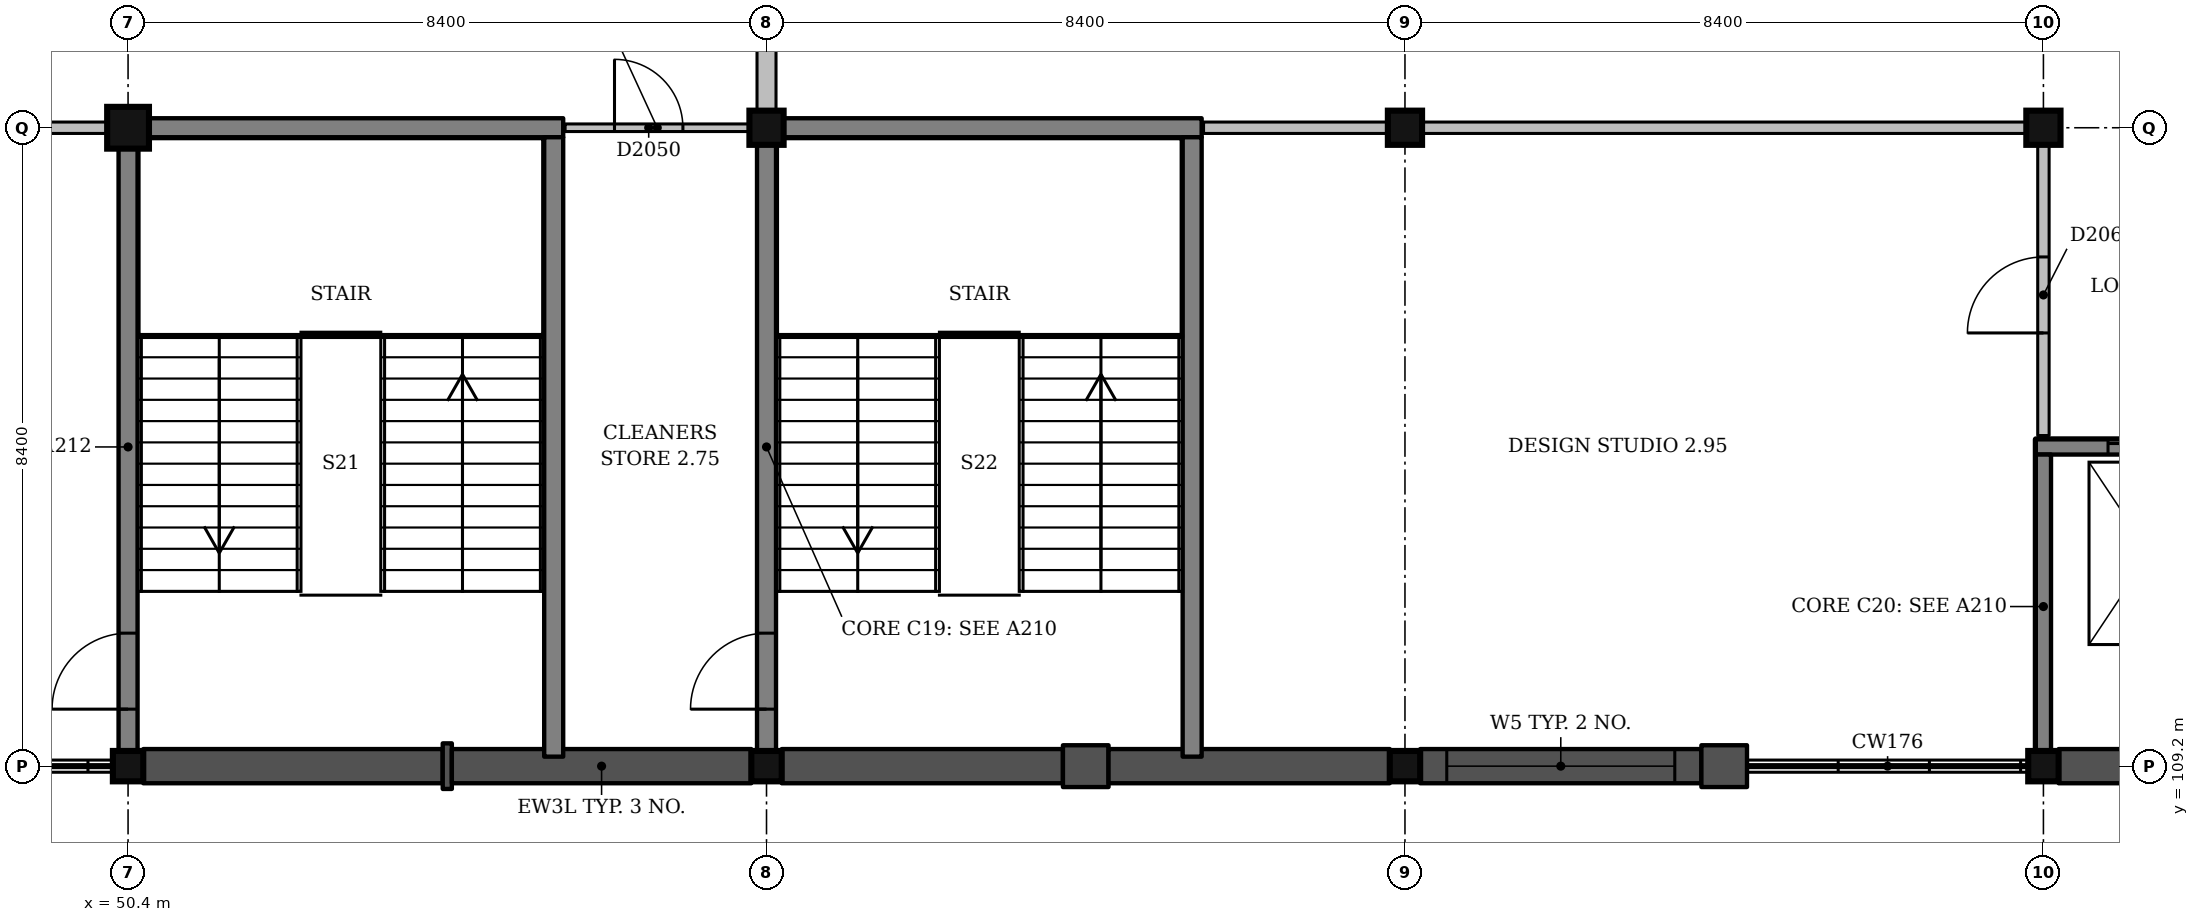
"""IFC4 building model, lengths in metres.
Left out: names, types, materials, properties, quantities, classifications, styles, units other than length and angle.
Written with IfcOpenShell. Run it as: python <this file> out.ifc"""

import sys

from ifc_helpers import new_model, si_unit, direction, frame, frame_2d, origin, origin_2d, place, context, subcontext, project, spatial, rectangle, extrude, element, fill, save


model = new_model("IFC4")
c1 = context("Model", 3, precision=1e-05, world=origin(), true_north=direction((0.0, 1.0)))
c2 = subcontext(c1, "Body", "Model", "MODEL_VIEW")
j1 = project(units=[si_unit("LENGTHUNIT", "METRE"), si_unit("PLANEANGLEUNIT", "RADIAN")], contexts=[c1])
p1 = place(None, origin())
s1 = spatial("IfcSite", under=j1, at=p1, CompositionType="ELEMENT")
p2 = place(p1, origin())
s2 = spatial("IfcBuilding", under=s1, at=p2, CompositionType="ELEMENT")
p3 = place(p2, frame((0.0, 0.0, 9.0)))
s3 = spatial("IfcBuildingStorey", under=s2, at=p3, CompositionType="ELEMENT", Elevation=9.0)
p4 = place(p3, frame((50.4, 109.2, -0.25), z_axis=(0.0, 0.0, 1.0), x_axis=(1.0, 0.0, 0.0)))
e1 = element("IfcColumn", 1, at=p4, inside=s3, PredefinedType="COLUMN", context=c2, shape_type="SweptSolid", body=[
    extrude(rectangle(XDim=0.4, YDim=0.4, at=origin_2d()), origin(), (0.0, 0.0, 1.0), 4.75),
])
p5 = place(p3, frame((50.4, 117.6, -1.5), z_axis=(0.0, 0.0, 1.0), x_axis=(1.0, 0.0, 0.0)))
e2 = element("IfcColumn", 2, at=p5, inside=s3, PredefinedType="COLUMN", context=c2, shape_type="SweptSolid", body=[
    extrude(rectangle(XDim=0.55, YDim=0.55, at=origin_2d()), origin(), (0.0, 0.0, 1.0), 6.0),
])
p6 = place(p3, frame((58.8, 109.2, -0.25), z_axis=(0.0, 0.0, 1.0), x_axis=(1.0, 0.0, 0.0)))
e3 = element("IfcColumn", 3, at=p6, inside=s3, PredefinedType="COLUMN", context=c2, shape_type="SweptSolid", body=[
    extrude(rectangle(XDim=0.4, YDim=0.4, at=origin_2d()), origin(), (0.0, 0.0, 1.0), 4.75),
])
p7 = place(p3, frame((58.8, 117.6, -1.5), z_axis=(0.0, 0.0, 1.0), x_axis=(1.0, 0.0, 0.0)))
e4 = element("IfcColumn", 4, at=p7, inside=s3, PredefinedType="COLUMN", context=c2, shape_type="SweptSolid", body=[
    extrude(rectangle(XDim=0.45, YDim=0.45, at=origin_2d()), origin(), (0.0, 0.0, 1.0), 6.0),
])
p8 = place(p3, frame((67.2, 109.2, -0.25), z_axis=(0.0, 0.0, 1.0), x_axis=(1.0, 0.0, 0.0)))
e5 = element("IfcColumn", 5, at=p8, inside=s3, PredefinedType="COLUMN", context=c2, shape_type="SweptSolid", body=[
    extrude(rectangle(XDim=0.4, YDim=0.4, at=origin_2d()), origin(), (0.0, 0.0, 1.0), 4.75),
])
p9 = place(p3, frame((67.2, 117.6, -1.5), z_axis=(0.0, 0.0, 1.0), x_axis=(1.0, 0.0, 0.0)))
e6 = element("IfcColumn", 6, at=p9, inside=s3, PredefinedType="COLUMN", context=c2, shape_type="SweptSolid", body=[
    extrude(rectangle(XDim=0.45, YDim=0.45, at=origin_2d()), origin(), (0.0, 0.0, 1.0), 6.0),
])
p10 = place(p3, frame((75.6, 109.2, -0.25), z_axis=(0.0, 0.0, 1.0), x_axis=(1.0, 0.0, 0.0)))
e7 = element("IfcColumn", 7, at=p10, inside=s3, PredefinedType="COLUMN", context=c2, shape_type="SweptSolid", body=[
    extrude(rectangle(XDim=0.4, YDim=0.4, at=origin_2d()), origin(), (0.0, 0.0, 1.0), 4.75),
])
p11 = place(p3, frame((75.6, 117.6, -1.5), z_axis=(0.0, 0.0, 1.0), x_axis=(1.0, 0.0, 0.0)))
e8 = element("IfcColumn", 8, at=p11, inside=s3, PredefinedType="COLUMN", context=c2, shape_type="SweptSolid", body=[
    extrude(rectangle(XDim=0.45, YDim=0.45, at=origin_2d()), origin(), (0.0, 0.0, 1.0), 6.0),
])
p12 = place(p3, frame((75.5, 113.4, 0.0), z_axis=(0.0, 0.0, 1.0), x_axis=(1.0, 0.0, 0.0)))
e9 = element("IfcWall", 9, at=p12, inside=s3, PredefinedType="SHEAR", context=c2, shape_type="SweptSolid", body=[
    extrude(rectangle(XDim=3.0, YDim=0.2, at=frame_2d((1.5, 0.0))), origin(), (0.0, 0.0, 1.0), 4.5),
])
p13 = place(p12, frame((0.95, 0.0, 0.0)))
e10 = element("IfcOpeningElement", 10, at=p13, cuts=e9, PredefinedType="OPENING", context=c2, shape_type="SweptSolid", body=[
    extrude(rectangle(XDim=1.1, YDim=2.1, at=frame_2d((0.55, 1.05))), frame((0.0, 0.11, 0.0), z_axis=(0.0, -1.0, 0.0), x_axis=(1.0, 0.0, 0.0)), (0.0, 0.0, 1.0), 0.22),
])
p14 = place(p3, frame((75.6, 109.4, 0.0), z_axis=(0.0, 0.0, 1.0), x_axis=(0.0, 1.0, 0.0)))
e11 = element("IfcWall", 11, at=p14, inside=s3, PredefinedType="SHEAR", context=c2, shape_type="SweptSolid", body=[
    extrude(rectangle(XDim=3.9, YDim=0.2, at=frame_2d((1.95, 0.0))), origin(), (0.0, 0.0, 1.0), 4.5),
])
p15 = place(p3, frame((59.025, 117.6, 0.0), z_axis=(0.0, 0.0, 1.0), x_axis=(1.0, 0.0, 0.0)))
e12 = element("IfcWall", 12, at=p15, inside=s3, PredefinedType="SHEAR", context=c2, shape_type="SweptSolid", body=[
    extrude(rectangle(XDim=5.5, YDim=0.25, at=frame_2d((2.75, 0.0))), origin(), (0.0, 0.0, 1.0), 4.5),
])
p16 = place(p3, frame((58.8, 109.4, 0.0), z_axis=(0.0, 0.0, 1.0), x_axis=(0.0, 1.0, 0.0)))
e13 = element("IfcWall", 13, at=p16, inside=s3, PredefinedType="SHEAR", context=c2, shape_type="SweptSolid", body=[
    extrude(rectangle(XDim=7.975, YDim=0.25, at=frame_2d((3.988, 0.0))), origin(), (0.0, 0.0, 1.0), 4.5),
])
p17 = place(p16, frame((0.55, 0.0, 0.0)))
e14 = element("IfcOpeningElement", 14, at=p17, cuts=e13, PredefinedType="OPENING", context=c2, shape_type="SweptSolid", body=[
    extrude(rectangle(XDim=1.0, YDim=2.1, at=frame_2d((0.5, 1.05))), frame((0.0, 0.135, 0.0), z_axis=(0.0, -1.0, 0.0), x_axis=(1.0, 0.0, 0.0)), (0.0, 0.0, 1.0), 0.27),
])
p18 = place(p3, frame((64.4, 109.325, 0.0), z_axis=(0.0, 0.0, 1.0), x_axis=(0.0, 1.0, 0.0)))
e15 = element("IfcWall", 15, at=p18, inside=s3, PredefinedType="SHEAR", context=c2, shape_type="SweptSolid", body=[
    extrude(rectangle(XDim=8.15, YDim=0.25, at=frame_2d((4.075, 0.0))), origin(), (0.0, 0.0, 1.0), 4.5),
])
p19 = place(p3, frame((50.675, 117.6, 0.0), z_axis=(0.0, 0.0, 1.0), x_axis=(1.0, 0.0, 0.0)))
e16 = element("IfcWall", 16, at=p19, inside=s3, PredefinedType="SHEAR", context=c2, shape_type="SweptSolid", body=[
    extrude(rectangle(XDim=5.45, YDim=0.25, at=frame_2d((2.725, 0.0))), origin(), (0.0, 0.0, 1.0), 4.5),
])
p20 = place(p3, frame((50.4, 109.4, 0.0), z_axis=(0.0, 0.0, 1.0), x_axis=(0.0, 1.0, 0.0)))
e17 = element("IfcWall", 17, at=p20, inside=s3, PredefinedType="SHEAR", context=c2, shape_type="SweptSolid", body=[
    extrude(rectangle(XDim=7.925, YDim=0.25, at=frame_2d((3.962, 0.0))), origin(), (0.0, 0.0, 1.0), 4.5),
])
p21 = place(p20, frame((0.55, 0.0, 0.0)))
e18 = element("IfcOpeningElement", 18, at=p21, cuts=e17, PredefinedType="OPENING", context=c2, shape_type="SweptSolid", body=[
    extrude(rectangle(XDim=1.0, YDim=2.1, at=frame_2d((0.5, 1.05))), frame((0.0, 0.135, 0.0), z_axis=(0.0, -1.0, 0.0), x_axis=(1.0, 0.0, 0.0)), (0.0, 0.0, 1.0), 0.27),
])
p22 = place(p3, frame((56.0, 109.325, 0.0), z_axis=(0.0, 0.0, 1.0), x_axis=(0.0, 1.0, 0.0)))
e19 = element("IfcWall", 19, at=p22, inside=s3, PredefinedType="SHEAR", context=c2, shape_type="SweptSolid", body=[
    extrude(rectangle(XDim=8.15, YDim=0.25, at=frame_2d((4.075, 0.0))), origin(), (0.0, 0.0, 1.0), 4.5),
])
p23 = place(p3, frame((50.6, 109.2, 0.0), z_axis=(0.0, 0.0, 1.0), x_axis=(1.0, 0.0, 0.0)))
e20 = element("IfcWall", 20, at=p23, inside=s3, PredefinedType="SOLIDWALL", context=c2, shape_type="SweptSolid", body=[
    extrude(rectangle(XDim=3.94, YDim=0.45, at=frame_2d((1.97, 0.0))), origin(), (0.0, 0.0, 1.0), 3.35),
])
p24 = place(p3, frame((54.54, 109.2, 0.0), z_axis=(0.0, 0.0, 1.0), x_axis=(1.0, 0.0, 0.0)))
e21 = element("IfcWall", 21, at=p24, inside=s3, PredefinedType="SOLIDWALL", context=c2, shape_type="SweptSolid", body=[
    extrude(rectangle(XDim=0.12, YDim=0.6, at=frame_2d((0.06, 0.0))), origin(), (0.0, 0.0, 1.0), 3.35),
])
p25 = place(p3, frame((54.66, 109.2, 0.0), z_axis=(0.0, 0.0, 1.0), x_axis=(1.0, 0.0, 0.0)))
e22 = element("IfcWall", 22, at=p25, inside=s3, PredefinedType="SOLIDWALL", context=c2, shape_type="SweptSolid", body=[
    extrude(rectangle(XDim=3.94, YDim=0.45, at=frame_2d((1.97, 0.0))), origin(), (0.0, 0.0, 1.0), 3.35),
])
p26 = place(p3, frame((59.0, 109.2, 0.0), z_axis=(0.0, 0.0, 1.0), x_axis=(1.0, 0.0, 0.0)))
e23 = element("IfcWall", 23, at=p26, inside=s3, PredefinedType="SOLIDWALL", context=c2, shape_type="SweptSolid", body=[
    extrude(rectangle(XDim=3.7, YDim=0.45, at=frame_2d((1.85, 0.0))), origin(), (0.0, 0.0, 1.0), 3.45),
])
p27 = place(p3, frame((62.7, 109.2, 0.0), z_axis=(0.0, 0.0, 1.0), x_axis=(1.0, 0.0, 0.0)))
e24 = element("IfcWall", 24, at=p27, inside=s3, PredefinedType="SOLIDWALL", context=c2, shape_type="SweptSolid", body=[
    extrude(rectangle(XDim=0.6, YDim=0.55, at=frame_2d((0.3, 0.0))), origin(), (0.0, 0.0, 1.0), 3.45),
])
p28 = place(p3, frame((63.3, 109.2, 0.0), z_axis=(0.0, 0.0, 1.0), x_axis=(1.0, 0.0, 0.0)))
e25 = element("IfcWall", 25, at=p28, inside=s3, PredefinedType="SOLIDWALL", context=c2, shape_type="SweptSolid", body=[
    extrude(rectangle(XDim=3.7, YDim=0.45, at=frame_2d((1.85, 0.0))), origin(), (0.0, 0.0, 1.0), 3.45),
])
p29 = place(p3, frame((67.4, 109.2, 0.0), z_axis=(0.0, 0.0, 1.0), x_axis=(1.0, 0.0, 0.0)))
e26 = element("IfcWall", 26, at=p29, inside=s3, PredefinedType="SOLIDWALL", context=c2, shape_type="SweptSolid", body=[
    extrude(rectangle(XDim=3.7, YDim=0.45, at=frame_2d((1.85, 0.0))), origin(), (0.0, 0.0, 1.0), 3.45),
])
p30 = place(p29, frame((0.35, 0.0, 0.9)))
e27 = element("IfcOpeningElement", 27, at=p30, cuts=e26, PredefinedType="OPENING", context=c2, shape_type="SweptSolid", body=[
    extrude(rectangle(XDim=3.0, YDim=2.1, at=frame_2d((1.5, 1.05))), frame((0.0, 0.235, 0.0), z_axis=(0.0, -1.0, 0.0), x_axis=(1.0, 0.0, 0.0)), (0.0, 0.0, 1.0), 0.47),
])
p31 = place(p3, frame((71.1, 109.2, 0.0), z_axis=(0.0, 0.0, 1.0), x_axis=(1.0, 0.0, 0.0)))
e28 = element("IfcWall", 28, at=p31, inside=s3, PredefinedType="SOLIDWALL", context=c2, shape_type="SweptSolid", body=[
    extrude(rectangle(XDim=0.6, YDim=0.55, at=frame_2d((0.3, 0.0))), origin(), (0.0, 0.0, 1.0), 3.45),
])
p32 = place(p3, frame((75.8, 109.2, 0.0), z_axis=(0.0, 0.0, 1.0), x_axis=(1.0, 0.0, 0.0)))
e29 = element("IfcWall", 29, at=p32, inside=s3, PredefinedType="SOLIDWALL", context=c2, shape_type="SweptSolid", body=[
    extrude(rectangle(XDim=3.7, YDim=0.45, at=frame_2d((1.85, 0.0))), origin(), (0.0, 0.0, 1.0), 3.45),
])
p33 = place(p3, frame((42.3, 117.6, 0.0), z_axis=(0.0, 0.0, 1.0), x_axis=(1.0, 0.0, 0.0)))
e30 = element("IfcWall", 30, at=p33, inside=s3, PredefinedType="PARTITIONING", context=c2, shape_type="SweptSolid", body=[
    extrude(rectangle(XDim=7.825, YDim=0.15, at=frame_2d((3.913, 0.0))), origin(), (0.0, 0.0, 1.0), 3.4),
])
p34 = place(p3, frame((64.55, 117.6, 0.0), z_axis=(0.0, 0.0, 1.0), x_axis=(1.0, 0.0, 0.0)))
e31 = element("IfcWall", 31, at=p34, inside=s3, PredefinedType="PARTITIONING", context=c2, shape_type="SweptSolid", body=[
    extrude(rectangle(XDim=2.425, YDim=0.15, at=frame_2d((1.212, 0.0))), origin(), (0.0, 0.0, 1.0), 3.6),
])
p35 = place(p3, frame((67.425, 117.6, 0.0), z_axis=(0.0, 0.0, 1.0), x_axis=(1.0, 0.0, 0.0)))
e32 = element("IfcWall", 32, at=p35, inside=s3, PredefinedType="PARTITIONING", context=c2, shape_type="SweptSolid", body=[
    extrude(rectangle(XDim=7.95, YDim=0.15, at=frame_2d((3.975, 0.0))), origin(), (0.0, 0.0, 1.0), 3.4),
])
p36 = place(p3, frame((56.15, 117.6, 0.0), z_axis=(0.0, 0.0, 1.0), x_axis=(1.0, 0.0, 0.0)))
e33 = element("IfcWall", 33, at=p36, inside=s3, PredefinedType="PARTITIONING", context=c2, shape_type="SweptSolid", body=[
    extrude(rectangle(XDim=2.425, YDim=0.1, at=frame_2d((1.212, 0.0))), origin(), (0.0, 0.0, 1.0), 3.5),
])
p37 = place(p36, frame((0.65, 0.0, 0.0)))
e34 = element("IfcOpeningElement", 34, at=p37, cuts=e33, PredefinedType="OPENING", context=c2, shape_type="SweptSolid", body=[
    extrude(rectangle(XDim=0.9, YDim=2.1, at=frame_2d((0.45, 1.05))), frame((0.0, 0.06, 0.0), z_axis=(0.0, -1.0, 0.0), x_axis=(1.0, 0.0, 0.0)), (0.0, 0.0, 1.0), 0.12),
])
p38 = place(p3, frame((58.8, 117.825, 0.0), z_axis=(0.0, 0.0, 1.0), x_axis=(0.0, 1.0, 0.0)))
e35 = element("IfcWall", 35, at=p38, inside=s3, PredefinedType="SOLIDWALL", context=c2, shape_type="SweptSolid", body=[
    extrude(rectangle(XDim=7.95, YDim=0.25, at=frame_2d((3.975, 0.0))), origin(), (0.0, 0.0, 1.0), 3.35),
])
p39 = place(p38, frame((1.0, 0.0, 0.0)))
e36 = element("IfcOpeningElement", 36, at=p39, cuts=e35, PredefinedType="OPENING", context=c2, shape_type="SweptSolid", body=[
    extrude(rectangle(XDim=1.8, YDim=2.1, at=frame_2d((0.9, 1.05))), frame((0.0, 0.135, 0.0), z_axis=(0.0, -1.0, 0.0), x_axis=(1.0, 0.0, 0.0)), (0.0, 0.0, 1.0), 0.27),
])
p40 = place(p3, frame((75.6, 113.55, 0.0), z_axis=(0.0, 0.0, 1.0), x_axis=(0.0, 1.0, 0.0)))
e37 = element("IfcWall", 37, at=p40, inside=s3, PredefinedType="PARTITIONING", context=c2, shape_type="SweptSolid", body=[
    extrude(rectangle(XDim=3.825, YDim=0.15, at=frame_2d((1.913, 0.0))), origin(), (0.0, 0.0, 1.0), 3.4),
])
p41 = place(p40, frame((1.35, 0.0, 0.0)))
e38 = element("IfcOpeningElement", 38, at=p41, cuts=e37, PredefinedType="OPENING", context=c2, shape_type="SweptSolid", body=[
    extrude(rectangle(XDim=1.0, YDim=2.1, at=frame_2d((0.5, 1.05))), frame((0.0, 0.085, 0.0), z_axis=(0.0, -1.0, 0.0), x_axis=(1.0, 0.0, 0.0)), (0.0, 0.0, 1.0), 0.17),
])
p42 = place(p30, origin())
e39 = element("IfcWindow", 39, at=p42, inside=s3, PartitioningType="SINGLE_PANEL", PredefinedType="WINDOW", context=c2, shape_type="SweptSolid", body=[
    extrude(rectangle(XDim=3.0, YDim=2.1, at=frame_2d((1.5, 1.05))), frame((0.0, 0.135, 0.0), z_axis=(0.0, -1.0, 0.0), x_axis=(1.0, 0.0, 0.0)), (0.0, 0.0, 1.0), 0.06),
])
fill(e27, e39)
p43 = place(p37, origin())
e40 = element("IfcDoor", 40, at=p43, inside=s3, OperationType="SINGLE_SWING_LEFT", PredefinedType="DOOR", context=c2, shape_type="SweptSolid", body=[
    extrude(rectangle(XDim=0.9, YDim=2.1, at=frame_2d((0.45, 1.05))), frame((0.0, 0.025, 0.0), z_axis=(0.0, -1.0, 0.0), x_axis=(1.0, 0.0, 0.0)), (0.0, 0.0, 1.0), 0.05),
])
fill(e34, e40)
p44 = place(p41, origin())
e41 = element("IfcDoor", 41, at=p44, inside=s3, OperationType="SINGLE_SWING_LEFT", PredefinedType="DOOR", context=c2, shape_type="SweptSolid", body=[
    extrude(rectangle(XDim=1.0, YDim=2.1, at=frame_2d((0.5, 1.05))), frame((0.0, 0.025, 0.0), z_axis=(0.0, -1.0, 0.0), x_axis=(1.0, 0.0, 0.0)), (0.0, 0.0, 1.0), 0.05),
])
fill(e38, e41)
p45 = place(p21, origin())
e42 = element("IfcDoor", 42, at=p45, inside=s3, OperationType="SINGLE_SWING_LEFT", PredefinedType="DOOR", context=c2, shape_type="SweptSolid", body=[
    extrude(rectangle(XDim=1.0, YDim=2.1, at=frame_2d((0.5, 1.05))), frame((0.0, 0.025, 0.0), z_axis=(0.0, -1.0, 0.0), x_axis=(1.0, 0.0, 0.0)), (0.0, 0.0, 1.0), 0.05),
])
fill(e18, e42)
p46 = place(p17, origin())
e43 = element("IfcDoor", 43, at=p46, inside=s3, OperationType="SINGLE_SWING_LEFT", PredefinedType="DOOR", context=c2, shape_type="SweptSolid", body=[
    extrude(rectangle(XDim=1.0, YDim=2.1, at=frame_2d((0.5, 1.05))), frame((0.0, 0.025, 0.0), z_axis=(0.0, -1.0, 0.0), x_axis=(1.0, 0.0, 0.0)), (0.0, 0.0, 1.0), 0.05),
])
fill(e14, e43)
p47 = place(p13, origin())
e44 = element("IfcDoor", 44, at=p47, inside=s3, OperationType="SLIDING_TO_LEFT", PredefinedType="DOOR", context=c2, shape_type="SweptSolid", body=[
    extrude(rectangle(XDim=1.1, YDim=2.1, at=frame_2d((0.55, 1.05))), frame((0.0, 0.025, 0.0), z_axis=(0.0, -1.0, 0.0), x_axis=(1.0, 0.0, 0.0)), (0.0, 0.0, 1.0), 0.05),
])
fill(e10, e44)
save(model, sys.argv[1])
